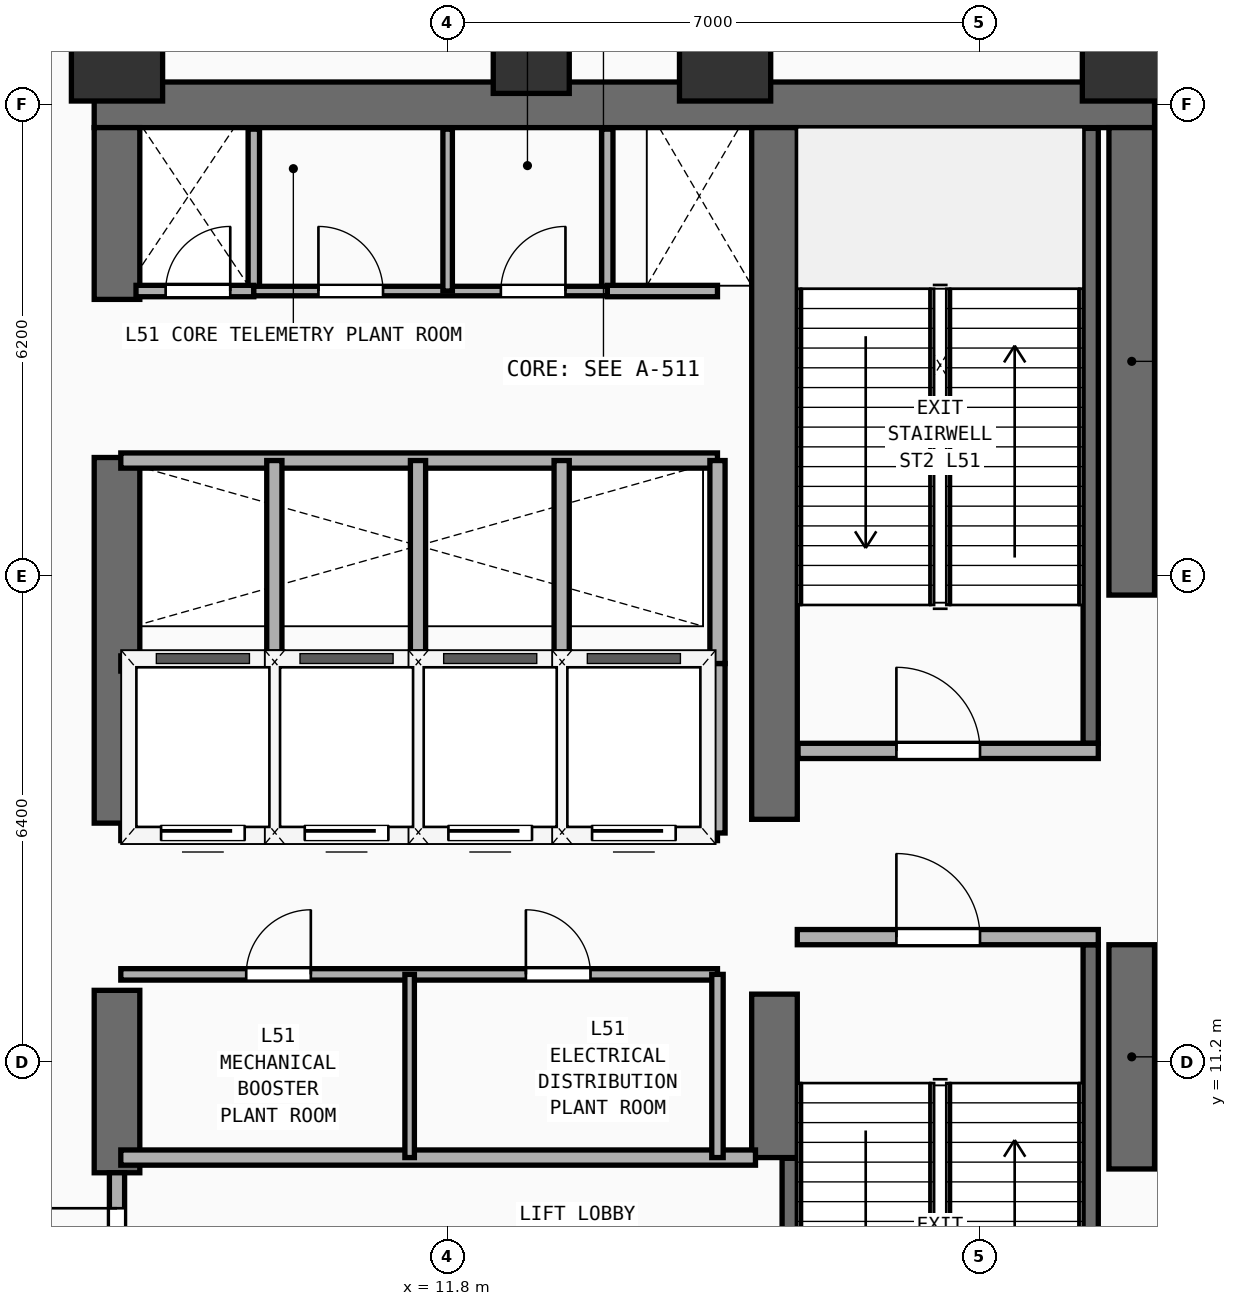
"""IFC4 building model, lengths in metres.
Left out: names, types, materials, properties, quantities, classifications, styles, units other than length and angle.
Written with IfcOpenShell. Run it as: python <this file> out.ifc"""

import sys

from ifc_helpers import new_model, si_unit, direction, frame, frame_2d, origin, origin_2d, place, context, subcontext, project, spatial, rectangle, extrude, element, fill, save


model = new_model("IFC4")
c1 = context("Model", 3, precision=1e-05, world=origin(), true_north=direction((0.0, 1.0)))
c2 = subcontext(c1, "Body", "Model", "MODEL_VIEW")
j1 = project(units=[si_unit("LENGTHUNIT", "METRE"), si_unit("PLANEANGLEUNIT", "RADIAN")], contexts=[c1])
p1 = place(None, origin())
s1 = spatial("IfcSite", under=j1, at=p1, CompositionType="ELEMENT")
p2 = place(p1, origin())
s2 = spatial("IfcBuilding", under=s1, at=p2, CompositionType="ELEMENT")
p3 = place(p2, frame((0.0, 0.0, 199.4)))
s3 = spatial("IfcBuildingStorey", under=s2, at=p3, CompositionType="ELEMENT", Elevation=199.4)
p4 = place(p3, frame((7.15, 23.8, 0.0), z_axis=(0.0, 0.0, 1.0), x_axis=(1.0, 0.0, 0.0)))
e1 = element("IfcWall", 1, at=p4, inside=s3, PredefinedType="SHEAR", context=c2, shape_type="SweptSolid", body=[
    extrude(rectangle(XDim=13.95, YDim=0.6, at=frame_2d((6.975, 0.0))), origin(), (0.0, 0.0, 1.0), 4.86),
])
p5 = place(p3, frame((7.45, 9.75, 0.0), z_axis=(0.0, 0.0, 1.0), x_axis=(0.0, 1.0, 0.0)))
e2 = element("IfcWall", 2, at=p5, inside=s3, PredefinedType="SHEAR", context=c2, shape_type="SweptSolid", body=[
    extrude(rectangle(XDim=2.4, YDim=0.6, at=frame_2d((1.2, 0.0))), origin(), (0.0, 0.0, 1.0), 4.86),
])
p6 = place(p3, frame((7.45, 14.35, 0.0), z_axis=(0.0, 0.0, 1.0), x_axis=(0.0, 1.0, 0.0)))
e3 = element("IfcWall", 3, at=p6, inside=s3, PredefinedType="SHEAR", context=c2, shape_type="SweptSolid", body=[
    extrude(rectangle(XDim=4.81, YDim=0.6, at=frame_2d((2.405, 0.0))), origin(), (0.0, 0.0, 1.0), 4.86),
])
p7 = place(p3, frame((7.45, 21.24, 0.0), z_axis=(0.0, 0.0, 1.0), x_axis=(0.0, 1.0, 0.0)))
e4 = element("IfcWall", 4, at=p7, inside=s3, PredefinedType="SHEAR", context=c2, shape_type="SweptSolid", body=[
    extrude(rectangle(XDim=2.26, YDim=0.6, at=frame_2d((1.13, 0.0))), origin(), (0.0, 0.0, 1.0), 4.86),
])
p8 = place(p3, frame((20.8, 9.8, 0.0), z_axis=(0.0, 0.0, 1.0), x_axis=(0.0, 1.0, 0.0)))
e5 = element("IfcWall", 5, at=p8, inside=s3, PredefinedType="SHEAR", context=c2, shape_type="SweptSolid", body=[
    extrude(rectangle(XDim=2.95, YDim=0.6, at=frame_2d((1.475, 0.0))), origin(), (0.0, 0.0, 1.0), 4.86),
])
p9 = place(p3, frame((20.8, 17.35, 0.0), z_axis=(0.0, 0.0, 1.0), x_axis=(0.0, 1.0, 0.0)))
e6 = element("IfcWall", 6, at=p9, inside=s3, PredefinedType="SHEAR", context=c2, shape_type="SweptSolid", body=[
    extrude(rectangle(XDim=6.15, YDim=0.6, at=frame_2d((3.075, 0.0))), origin(), (0.0, 0.0, 1.0), 4.86),
])
p10 = place(p3, frame((16.1, 9.95, 0.0), z_axis=(0.0, 0.0, 1.0), x_axis=(0.0, 1.0, 0.0)))
e7 = element("IfcWall", 7, at=p10, inside=s3, PredefinedType="SHEAR", context=c2, shape_type="SweptSolid", body=[
    extrude(rectangle(XDim=2.15, YDim=0.6, at=frame_2d((1.075, 0.0))), origin(), (0.0, 0.0, 1.0), 4.86),
])
p11 = place(p3, frame((16.1, 14.4, 0.0), z_axis=(0.0, 0.0, 1.0), x_axis=(0.0, 1.0, 0.0)))
e8 = element("IfcWall", 8, at=p11, inside=s3, PredefinedType="SHEAR", context=c2, shape_type="SweptSolid", body=[
    extrude(rectangle(XDim=9.1, YDim=0.6, at=frame_2d((4.55, 0.0))), origin(), (0.0, 0.0, 1.0), 4.86),
])
for number, where, z_axis, x_axis in (
    (9, (7.45, 24.45, 0.0), (0.0, 0.0, 1.0), (1.0, 0.0, 0.0)),
    (10, (15.45, 24.45, 0.0), (0.0, 0.0, 1.0), (1.0, 0.0, 0.0)),
    (11, (20.75, 24.45, 0.0), (0.0, 0.0, 1.0), (1.0, 0.0, 0.0)),
):
    element("IfcColumn", number, at=place(p3, frame(where, z_axis=z_axis, x_axis=x_axis)), inside=s3, PredefinedType="COLUMN", context=c2, shape_type="SweptSolid", body=[
        extrude(rectangle(XDim=1.2, YDim=1.2, at=origin_2d()), origin(), (0.0, 0.0, 1.0), 4.86),
    ])
p12 = place(p3, frame((12.9, 24.45, 0.0), z_axis=(0.0, 0.0, 1.0), x_axis=(1.0, 0.0, 0.0)))
e12 = element("IfcColumn", 12, at=p12, inside=s3, PredefinedType="COLUMN", context=c2, shape_type="SweptSolid", body=[
    extrude(rectangle(XDim=1.0, YDim=1.0, at=origin_2d()), origin(), (0.0, 0.0, 1.0), 4.86),
])
p13 = place(p3, frame((16.3, 7.36, 0.0), z_axis=(0.0, 0.0, 1.0), x_axis=(0.0, 1.0, 0.0)))
e13 = element("IfcWall", 13, at=p13, inside=s3, PredefinedType="SHEAR", context=c2, shape_type="SweptSolid", body=[
    extrude(rectangle(XDim=2.58, YDim=0.2, at=frame_2d((1.29, 0.0))), origin(), (0.0, 0.0, 1.0), 4.86),
])
p14 = place(p3, frame((20.26, 4.66, 0.0), z_axis=(0.0, 0.0, 1.0), x_axis=(0.0, 1.0, 0.0)))
e14 = element("IfcWall", 14, at=p14, inside=s3, PredefinedType="SHEAR", context=c2, shape_type="SweptSolid", body=[
    extrude(rectangle(XDim=8.09, YDim=0.2, at=frame_2d((4.045, 0.0))), origin(), (0.0, 0.0, 1.0), 4.86),
])
p15 = place(p3, frame((16.4, 12.85, 0.0), z_axis=(0.0, 0.0, 1.0), x_axis=(1.0, 0.0, 0.0)))
e15 = element("IfcWall", 15, at=p15, inside=s3, PredefinedType="PARTITIONING", context=c2, shape_type="SweptSolid", body=[
    extrude(rectangle(XDim=3.96, YDim=0.2, at=frame_2d((1.98, 0.0))), origin(), (0.0, 0.0, 1.0), 4.86),
])
p16 = place(p15, frame((1.304, 0.0, 0.0)))
e16 = element("IfcOpeningElement", 16, at=p16, cuts=e15, PredefinedType="OPENING", context=c2, shape_type="SweptSolid", body=[
    extrude(rectangle(XDim=1.1, YDim=2.2, at=frame_2d((0.55, 1.1))), frame((0.0, 0.11, 0.0), z_axis=(0.0, -1.0, 0.0), x_axis=(1.0, 0.0, 0.0)), (0.0, 0.0, 1.0), 0.22),
])
p17 = place(p3, frame((20.26, 15.4, 0.0), z_axis=(0.0, 0.0, 1.0), x_axis=(0.0, 1.0, 0.0)))
e17 = element("IfcWall", 17, at=p17, inside=s3, PredefinedType="SHEAR", context=c2, shape_type="SweptSolid", body=[
    extrude(rectangle(XDim=8.09, YDim=0.2, at=frame_2d((4.045, 0.0))), origin(), (0.0, 0.0, 1.0), 4.86),
])
p18 = place(p3, frame((16.41, 15.3, 0.0), z_axis=(0.0, 0.0, 1.0), x_axis=(1.0, 0.0, 0.0)))
e18 = element("IfcWall", 18, at=p18, inside=s3, PredefinedType="PARTITIONING", context=c2, shape_type="SweptSolid", body=[
    extrude(rectangle(XDim=3.95, YDim=0.2, at=frame_2d((1.975, 0.0))), origin(), (0.0, 0.0, 1.0), 4.86),
])
p19 = place(p18, frame((1.294, 0.0, 0.0)))
e19 = element("IfcOpeningElement", 19, at=p19, cuts=e18, PredefinedType="OPENING", context=c2, shape_type="SweptSolid", body=[
    extrude(rectangle(XDim=1.1, YDim=2.2, at=frame_2d((0.55, 1.1))), frame((0.0, 0.11, 0.0), z_axis=(0.0, -1.0, 0.0), x_axis=(1.0, 0.0, 0.0)), (0.0, 0.0, 1.0), 0.22),
])
p20 = place(p3, frame((7.5, 9.95, 0.0), z_axis=(0.0, 0.0, 1.0), x_axis=(1.0, 0.0, 0.0)))
e20 = element("IfcWall", 20, at=p20, inside=s3, PredefinedType="PARTITIONING", context=c2, shape_type="SweptSolid", body=[
    extrude(rectangle(XDim=8.35, YDim=0.2, at=frame_2d((4.175, 0.0))), origin(), (0.0, 0.0, 1.0), 4.86),
])
p21 = place(p3, frame((7.45, 7.45, 0.0), z_axis=(0.0, 0.0, 1.0), x_axis=(0.0, 1.0, 0.0)))
e21 = element("IfcWall", 21, at=p21, inside=s3, PredefinedType="PARTITIONING", context=c2, shape_type="SweptSolid", body=[
    extrude(rectangle(XDim=2.3, YDim=0.2, at=frame_2d((1.15, 0.0))), origin(), (0.0, 0.0, 1.0), 3.84),
])
p22 = place(p21, frame((0.633, 0.0, 0.0)))
e22 = element("IfcOpeningElement", 22, at=p22, cuts=e21, PredefinedType="OPENING", context=c2, shape_type="SweptSolid", body=[
    extrude(rectangle(XDim=1.2, YDim=2.25, at=frame_2d((0.6, 1.125))), frame((0.0, 0.11, 0.0), z_axis=(0.0, -1.0, 0.0), x_axis=(1.0, 0.0, 0.0)), (0.0, 0.0, 1.0), 0.22),
])
p23 = place(p3, frame((7.5, 12.36, 0.0), z_axis=(0.0, 0.0, 1.0), x_axis=(1.0, 0.0, 0.0)))
e23 = element("IfcWall", 23, at=p23, inside=s3, PredefinedType="PARTITIONING", context=c2, shape_type="SweptSolid", body=[
    extrude(rectangle(XDim=7.85, YDim=0.15, at=frame_2d((3.925, 0.0))), origin(), (0.0, 0.0, 1.0), 4.86),
])
p24 = place(p23, frame((1.65, 0.0, 0.0)))
e24 = element("IfcOpeningElement", 24, at=p24, cuts=e23, PredefinedType="OPENING", context=c2, shape_type="SweptSolid", body=[
    extrude(rectangle(XDim=0.85, YDim=2.15, at=frame_2d((0.425, 1.075))), frame((0.0, 0.085, 0.0), z_axis=(0.0, -1.0, 0.0), x_axis=(1.0, 0.0, 0.0)), (0.0, 0.0, 1.0), 0.17),
])
p25 = place(p23, frame((5.329, 0.0, 0.0)))
e25 = element("IfcOpeningElement", 25, at=p25, cuts=e23, PredefinedType="OPENING", context=c2, shape_type="SweptSolid", body=[
    extrude(rectangle(XDim=0.85, YDim=2.15, at=frame_2d((0.425, 1.075))), frame((0.0, 0.085, 0.0), z_axis=(0.0, -1.0, 0.0), x_axis=(1.0, 0.0, 0.0)), (0.0, 0.0, 1.0), 0.17),
])
p26 = place(p3, frame((15.35, 9.95, 0.0), z_axis=(0.0, 0.0, 1.0), x_axis=(0.0, 1.0, 0.0)))
e26 = element("IfcWall", 26, at=p26, inside=s3, PredefinedType="PARTITIONING", context=c2, shape_type="SweptSolid", body=[
    extrude(rectangle(XDim=2.41, YDim=0.15, at=frame_2d((1.205, 0.0))), origin(), (0.0, 0.0, 1.0), 4.86),
])
p27 = place(p3, frame((11.3, 9.95, 0.0), z_axis=(0.0, 0.0, 1.0), x_axis=(0.0, 1.0, 0.0)))
e27 = element("IfcWall", 27, at=p27, inside=s3, PredefinedType="PARTITIONING", context=c2, shape_type="SweptSolid", body=[
    extrude(rectangle(XDim=2.41, YDim=0.125, at=frame_2d((1.205, 0.0))), origin(), (0.0, 0.0, 1.0), 4.86),
])
p28 = place(p3, frame((7.5, 14.22, 0.0), z_axis=(0.0, 0.0, 1.0), x_axis=(1.0, 0.0, 0.0)))
e28 = element("IfcWall", 28, at=p28, inside=s3, PredefinedType="PARTITIONING", context=c2, shape_type="SweptSolid", body=[
    extrude(rectangle(XDim=7.85, YDim=0.2, at=frame_2d((3.925, 0.0))), origin(), (0.0, 0.0, 1.0), 4.86),
])
p29 = place(p28, frame((0.53, 0.0, 0.0)))
e29 = element("IfcOpeningElement", 29, at=p29, cuts=e28, PredefinedType="OPENING", context=c2, shape_type="SweptSolid", body=[
    extrude(rectangle(XDim=1.1, YDim=2.2, at=frame_2d((0.55, 1.1))), frame((0.0, 0.11, 0.0), z_axis=(0.0, -1.0, 0.0), x_axis=(1.0, 0.0, 0.0)), (0.0, 0.0, 1.0), 0.22),
])
p30 = place(p28, frame((2.42, 0.0, 0.0)))
e30 = element("IfcOpeningElement", 30, at=p30, cuts=e28, PredefinedType="OPENING", context=c2, shape_type="SweptSolid", body=[
    extrude(rectangle(XDim=1.1, YDim=2.2, at=frame_2d((0.55, 1.1))), frame((0.0, 0.11, 0.0), z_axis=(0.0, -1.0, 0.0), x_axis=(1.0, 0.0, 0.0)), (0.0, 0.0, 1.0), 0.22),
])
p31 = place(p28, frame((4.31, 0.0, 0.0)))
e31 = element("IfcOpeningElement", 31, at=p31, cuts=e28, PredefinedType="OPENING", context=c2, shape_type="SweptSolid", body=[
    extrude(rectangle(XDim=1.1, YDim=2.2, at=frame_2d((0.55, 1.1))), frame((0.0, 0.11, 0.0), z_axis=(0.0, -1.0, 0.0), x_axis=(1.0, 0.0, 0.0)), (0.0, 0.0, 1.0), 0.22),
])
p32 = place(p28, frame((6.2, 0.0, 0.0)))
e32 = element("IfcOpeningElement", 32, at=p32, cuts=e28, PredefinedType="OPENING", context=c2, shape_type="SweptSolid", body=[
    extrude(rectangle(XDim=1.1, YDim=2.2, at=frame_2d((0.55, 1.1))), frame((0.0, 0.11, 0.0), z_axis=(0.0, -1.0, 0.0), x_axis=(1.0, 0.0, 0.0)), (0.0, 0.0, 1.0), 0.22),
])
p33 = place(p3, frame((7.5, 16.45, 0.0), z_axis=(0.0, 0.0, 1.0), x_axis=(1.0, 0.0, 0.0)))
e33 = element("IfcWall", 33, at=p33, inside=s3, PredefinedType="PARTITIONING", context=c2, shape_type="SweptSolid", body=[
    extrude(rectangle(XDim=7.85, YDim=0.2, at=frame_2d((3.925, 0.0))), origin(), (0.0, 0.0, 1.0), 4.86),
])
for number, where, z_axis, x_axis in (
    (34, (15.35, 14.22, 0.0), (0.0, 0.0, 1.0), (0.0, 1.0, 0.0)),
    (35, (9.52, 14.22, 0.0), (0.0, 0.0, 1.0), (0.0, 1.0, 0.0)),
    (36, (11.41, 14.22, 0.0), (0.0, 0.0, 1.0), (0.0, 1.0, 0.0)),
    (37, (13.3, 14.22, 0.0), (0.0, 0.0, 1.0), (0.0, 1.0, 0.0)),
):
    element("IfcWall", number, at=place(p3, frame(where, z_axis=z_axis, x_axis=x_axis)), inside=s3, PredefinedType="PARTITIONING", context=c2, shape_type="SweptSolid", body=[
        extrude(rectangle(XDim=2.23, YDim=0.2, at=frame_2d((1.115, 0.0))), origin(), (0.0, 0.0, 1.0), 4.86),
    ])
p34 = place(p3, frame((7.5, 19.12, 0.0), z_axis=(0.0, 0.0, 1.0), x_axis=(1.0, 0.0, 0.0)))
e38 = element("IfcWall", 38, at=p34, inside=s3, PredefinedType="PARTITIONING", context=c2, shape_type="SweptSolid", body=[
    extrude(rectangle(XDim=7.85, YDim=0.2, at=frame_2d((3.925, 0.0))), origin(), (0.0, 0.0, 1.0), 4.86),
])
for number, where, z_axis, x_axis in (
    (39, (15.35, 16.45, 0.0), (0.0, 0.0, 1.0), (0.0, 1.0, 0.0)),
    (40, (9.52, 16.45, 0.0), (0.0, 0.0, 1.0), (0.0, 1.0, 0.0)),
    (41, (11.41, 16.45, 0.0), (0.0, 0.0, 1.0), (0.0, 1.0, 0.0)),
    (42, (13.3, 16.45, 0.0), (0.0, 0.0, 1.0), (0.0, 1.0, 0.0)),
):
    element("IfcWall", number, at=place(p3, frame(where, z_axis=z_axis, x_axis=x_axis)), inside=s3, PredefinedType="PARTITIONING", context=c2, shape_type="SweptSolid", body=[
        extrude(rectangle(XDim=2.67, YDim=0.2, at=frame_2d((1.335, 0.0))), origin(), (0.0, 0.0, 1.0), 4.86),
    ])
for number, where, z_axis, x_axis in (
    (43, (9.25, 21.35, 0.0), (0.0, 0.0, 1.0), (0.0, 1.0, 0.0)),
    (44, (13.9, 21.35, 0.0), (0.0, 0.0, 1.0), (0.0, 1.0, 0.0)),
):
    element("IfcWall", number, at=place(p3, frame(where, z_axis=z_axis, x_axis=x_axis)), inside=s3, PredefinedType="PARTITIONING", context=c2, shape_type="SweptSolid", body=[
        extrude(rectangle(XDim=2.13, YDim=0.15, at=frame_2d((1.065, 0.0))), origin(), (0.0, 0.0, 1.0), 4.86),
    ])
p35 = place(p3, frame((7.7, 21.35, 0.0), z_axis=(0.0, 0.0, 1.0), x_axis=(1.0, 0.0, 0.0)))
e45 = element("IfcWall", 45, at=p35, inside=s3, PredefinedType="PARTITIONING", context=c2, shape_type="SweptSolid", body=[
    extrude(rectangle(XDim=1.55, YDim=0.15, at=frame_2d((0.775, 0.0))), origin(), (0.0, 0.0, 1.0), 4.86),
])
p36 = place(p35, frame((0.39, 0.0, 0.0)))
e46 = element("IfcOpeningElement", 46, at=p36, cuts=e45, PredefinedType="OPENING", context=c2, shape_type="SweptSolid", body=[
    extrude(rectangle(XDim=0.85, YDim=2.15, at=frame_2d((0.425, 1.075))), frame((0.0, 0.085, 0.0), z_axis=(0.0, -1.0, 0.0), x_axis=(1.0, 0.0, 0.0)), (0.0, 0.0, 1.0), 0.17),
])
p37 = place(p3, frame((13.9, 21.35, 0.0), z_axis=(0.0, 0.0, 1.0), x_axis=(1.0, 0.0, 0.0)))
e47 = element("IfcWall", 47, at=p37, inside=s3, PredefinedType="PARTITIONING", context=c2, shape_type="SweptSolid", body=[
    extrude(rectangle(XDim=1.45, YDim=0.15, at=frame_2d((0.725, 0.0))), origin(), (0.0, 0.0, 1.0), 4.86),
])
p38 = place(p3, frame((9.25, 21.35, 0.0), z_axis=(0.0, 0.0, 1.0), x_axis=(1.0, 0.0, 0.0)))
e48 = element("IfcWall", 48, at=p38, inside=s3, PredefinedType="PARTITIONING", context=c2, shape_type="SweptSolid", body=[
    extrude(rectangle(XDim=4.65, YDim=0.125, at=frame_2d((2.325, 0.0))), origin(), (0.0, 0.0, 1.0), 4.86),
])
p39 = place(p38, frame((0.85, 0.0, 0.0)))
e49 = element("IfcOpeningElement", 49, at=p39, cuts=e48, PredefinedType="OPENING", context=c2, shape_type="SweptSolid", body=[
    extrude(rectangle(XDim=0.85, YDim=2.15, at=frame_2d((0.425, 1.075))), frame((0.0, 0.073, 0.0), z_axis=(0.0, -1.0, 0.0), x_axis=(1.0, 0.0, 0.0)), (0.0, 0.0, 1.0), 0.145),
])
p40 = place(p38, frame((3.25, 0.0, 0.0)))
e50 = element("IfcOpeningElement", 50, at=p40, cuts=e48, PredefinedType="OPENING", context=c2, shape_type="SweptSolid", body=[
    extrude(rectangle(XDim=0.85, YDim=2.15, at=frame_2d((0.425, 1.075))), frame((0.0, 0.073, 0.0), z_axis=(0.0, -1.0, 0.0), x_axis=(1.0, 0.0, 0.0)), (0.0, 0.0, 1.0), 0.145),
])
p41 = place(p3, frame((11.8, 21.35, 0.0), z_axis=(0.0, 0.0, 1.0), x_axis=(0.0, 1.0, 0.0)))
e51 = element("IfcWall", 51, at=p41, inside=s3, PredefinedType="PARTITIONING", context=c2, shape_type="SweptSolid", body=[
    extrude(rectangle(XDim=2.13, YDim=0.125, at=frame_2d((1.065, 0.0))), origin(), (0.0, 0.0, 1.0), 4.86),
])
p42 = place(p16, frame((1.1, 0.0, 0.0), z_axis=(0.0, 0.0, 1.0), x_axis=(-1.0, 0.0, 0.0)))
e52 = element("IfcDoor", 52, at=p42, inside=s3, OperationType="SINGLE_SWING_RIGHT", PredefinedType="DOOR", context=c2, shape_type="SweptSolid", body=[
    extrude(rectangle(XDim=1.1, YDim=2.2, at=frame_2d((0.55, 1.1))), frame((0.0, 0.025, 0.0), z_axis=(0.0, -1.0, 0.0), x_axis=(1.0, 0.0, 0.0)), (0.0, 0.0, 1.0), 0.05),
])
fill(e16, e52)
p43 = place(p19, origin())
e53 = element("IfcDoor", 53, at=p43, inside=s3, OperationType="SINGLE_SWING_LEFT", PredefinedType="DOOR", context=c2, shape_type="SweptSolid", body=[
    extrude(rectangle(XDim=1.1, YDim=2.2, at=frame_2d((0.55, 1.1))), frame((0.0, 0.025, 0.0), z_axis=(0.0, -1.0, 0.0), x_axis=(1.0, 0.0, 0.0)), (0.0, 0.0, 1.0), 0.05),
])
fill(e19, e53)
p44 = place(p22, frame((1.2, 0.0, 0.0), z_axis=(0.0, 0.0, 1.0), x_axis=(-1.0, 0.0, 0.0)))
e54 = element("IfcDoor", 54, at=p44, inside=s3, OperationType="SINGLE_SWING_LEFT", PredefinedType="DOOR", context=c2, shape_type="SweptSolid", body=[
    extrude(rectangle(XDim=1.2, YDim=2.25, at=frame_2d((0.6, 1.125))), frame((0.0, 0.025, 0.0), z_axis=(0.0, -1.0, 0.0), x_axis=(1.0, 0.0, 0.0)), (0.0, 0.0, 1.0), 0.05),
])
fill(e22, e54)
p45 = place(p24, origin())
e55 = element("IfcDoor", 55, at=p45, inside=s3, OperationType="SINGLE_SWING_RIGHT", PredefinedType="DOOR", context=c2, shape_type="SweptSolid", body=[
    extrude(rectangle(XDim=0.85, YDim=2.15, at=frame_2d((0.425, 1.075))), frame((0.0, 0.025, 0.0), z_axis=(0.0, -1.0, 0.0), x_axis=(1.0, 0.0, 0.0)), (0.0, 0.0, 1.0), 0.05),
])
fill(e24, e55)
p46 = place(p25, origin())
e56 = element("IfcDoor", 56, at=p46, inside=s3, OperationType="SINGLE_SWING_LEFT", PredefinedType="DOOR", context=c2, shape_type="SweptSolid", body=[
    extrude(rectangle(XDim=0.85, YDim=2.15, at=frame_2d((0.425, 1.075))), frame((0.0, 0.025, 0.0), z_axis=(0.0, -1.0, 0.0), x_axis=(1.0, 0.0, 0.0)), (0.0, 0.0, 1.0), 0.05),
])
fill(e25, e56)
p47 = place(p29, frame((1.1, 0.0, 0.0), z_axis=(0.0, 0.0, 1.0), x_axis=(-1.0, 0.0, 0.0)))
e57 = element("IfcDoor", 57, at=p47, inside=s3, OperationType="SLIDING_TO_LEFT", PredefinedType="DOOR", context=c2, shape_type="SweptSolid", body=[
    extrude(rectangle(XDim=1.1, YDim=2.2, at=frame_2d((0.55, 1.1))), frame((0.0, 0.025, 0.0), z_axis=(0.0, -1.0, 0.0), x_axis=(1.0, 0.0, 0.0)), (0.0, 0.0, 1.0), 0.05),
])
fill(e29, e57)
p48 = place(p30, frame((1.1, 0.0, 0.0), z_axis=(0.0, 0.0, 1.0), x_axis=(-1.0, 0.0, 0.0)))
e58 = element("IfcDoor", 58, at=p48, inside=s3, OperationType="SLIDING_TO_LEFT", PredefinedType="DOOR", context=c2, shape_type="SweptSolid", body=[
    extrude(rectangle(XDim=1.1, YDim=2.2, at=frame_2d((0.55, 1.1))), frame((0.0, 0.025, 0.0), z_axis=(0.0, -1.0, 0.0), x_axis=(1.0, 0.0, 0.0)), (0.0, 0.0, 1.0), 0.05),
])
fill(e30, e58)
p49 = place(p31, frame((1.1, 0.0, 0.0), z_axis=(0.0, 0.0, 1.0), x_axis=(-1.0, 0.0, 0.0)))
e59 = element("IfcDoor", 59, at=p49, inside=s3, OperationType="SLIDING_TO_LEFT", PredefinedType="DOOR", context=c2, shape_type="SweptSolid", body=[
    extrude(rectangle(XDim=1.1, YDim=2.2, at=frame_2d((0.55, 1.1))), frame((0.0, 0.025, 0.0), z_axis=(0.0, -1.0, 0.0), x_axis=(1.0, 0.0, 0.0)), (0.0, 0.0, 1.0), 0.05),
])
fill(e31, e59)
p50 = place(p32, frame((1.1, 0.0, 0.0), z_axis=(0.0, 0.0, 1.0), x_axis=(-1.0, 0.0, 0.0)))
e60 = element("IfcDoor", 60, at=p50, inside=s3, OperationType="SLIDING_TO_LEFT", PredefinedType="DOOR", context=c2, shape_type="SweptSolid", body=[
    extrude(rectangle(XDim=1.1, YDim=2.2, at=frame_2d((0.55, 1.1))), frame((0.0, 0.025, 0.0), z_axis=(0.0, -1.0, 0.0), x_axis=(1.0, 0.0, 0.0)), (0.0, 0.0, 1.0), 0.05),
])
fill(e32, e60)
p51 = place(p36, origin())
e61 = element("IfcDoor", 61, at=p51, inside=s3, OperationType="SINGLE_SWING_RIGHT", PredefinedType="DOOR", context=c2, shape_type="SweptSolid", body=[
    extrude(rectangle(XDim=0.85, YDim=2.15, at=frame_2d((0.425, 1.075))), frame((0.0, 0.025, 0.0), z_axis=(0.0, -1.0, 0.0), x_axis=(1.0, 0.0, 0.0)), (0.0, 0.0, 1.0), 0.05),
])
fill(e46, e61)
p52 = place(p39, origin())
e62 = element("IfcDoor", 62, at=p52, inside=s3, OperationType="SINGLE_SWING_LEFT", PredefinedType="DOOR", context=c2, shape_type="SweptSolid", body=[
    extrude(rectangle(XDim=0.85, YDim=2.15, at=frame_2d((0.425, 1.075))), frame((0.0, 0.025, 0.0), z_axis=(0.0, -1.0, 0.0), x_axis=(1.0, 0.0, 0.0)), (0.0, 0.0, 1.0), 0.05),
])
fill(e49, e62)
p53 = place(p40, origin())
e63 = element("IfcDoor", 63, at=p53, inside=s3, OperationType="SINGLE_SWING_RIGHT", PredefinedType="DOOR", context=c2, shape_type="SweptSolid", body=[
    extrude(rectangle(XDim=0.85, YDim=2.15, at=frame_2d((0.425, 1.075))), frame((0.0, 0.025, 0.0), z_axis=(0.0, -1.0, 0.0), x_axis=(1.0, 0.0, 0.0)), (0.0, 0.0, 1.0), 0.05),
])
fill(e50, e63)
save(model, sys.argv[1])
